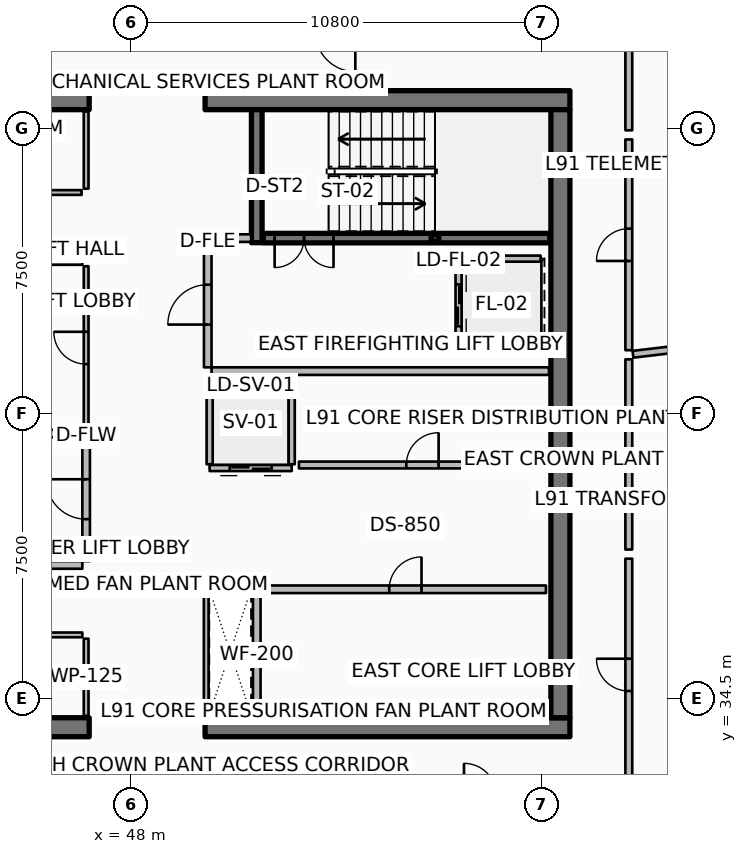
"""IFC4 building model, lengths in metres.
Left out: names, types, materials, properties, quantities, classifications, styles, units other than length and angle.
Written with IfcOpenShell. Run it as: python <this file> out.ifc"""

import sys

from ifc_helpers import new_model, si_unit, direction, frame, frame_2d, origin, origin_2d, place, context, subcontext, project, spatial, rectangle, hollow_rectangle, extrude, element, fill, save


model = new_model("IFC4")
c1 = context("Model", 3, precision=1e-05, world=origin(), true_north=direction((0.0, 1.0)))
c2 = subcontext(c1, "Body", "Model", "MODEL_VIEW")
j1 = project(units=[si_unit("LENGTHUNIT", "METRE"), si_unit("PLANEANGLEUNIT", "RADIAN")], contexts=[c1])
p1 = place(None, origin())
s1 = spatial("IfcSite", under=j1, at=p1, CompositionType="ELEMENT")
p2 = place(p1, origin())
s2 = spatial("IfcBuilding", under=s1, at=p2, CompositionType="ELEMENT")
p3 = place(p2, frame((0.0, 0.0, 363.2)))
s3 = spatial("IfcBuildingStorey", under=s2, at=p3, CompositionType="ELEMENT", Elevation=363.2)
p4 = place(p3, frame((37.3, 33.75, 0.0), z_axis=(0.0, 0.0, 1.0), x_axis=(1.0, 0.0, 0.0)))
e1 = element("IfcWall", 1, at=p4, inside=s3, PredefinedType="SHEAR", context=c2, shape_type="SweptSolid", body=[
    extrude(rectangle(XDim=9.6, YDim=0.5, at=frame_2d((4.8, 0.0))), origin(), (0.0, 0.0, 1.0), 3.6),
])
p5 = place(p3, frame((49.95, 33.75, 0.0), z_axis=(0.0, 0.0, 1.0), x_axis=(1.0, 0.0, 0.0)))
e2 = element("IfcWall", 2, at=p5, inside=s3, PredefinedType="SHEAR", context=c2, shape_type="SweptSolid", body=[
    extrude(rectangle(XDim=9.6, YDim=0.5, at=frame_2d((4.8, 0.0))), origin(), (0.0, 0.0, 1.0), 3.6),
])
p6 = place(p3, frame((37.3, 50.25, 0.0), z_axis=(0.0, 0.0, 1.0), x_axis=(1.0, 0.0, 0.0)))
e3 = element("IfcWall", 3, at=p6, inside=s3, PredefinedType="SHEAR", context=c2, shape_type="SweptSolid", body=[
    extrude(rectangle(XDim=9.6, YDim=0.5, at=frame_2d((4.8, 0.0))), origin(), (0.0, 0.0, 1.0), 3.6),
])
p7 = place(p3, frame((49.95, 50.25, 0.0), z_axis=(0.0, 0.0, 1.0), x_axis=(1.0, 0.0, 0.0)))
e4 = element("IfcWall", 4, at=p7, inside=s3, PredefinedType="SHEAR", context=c2, shape_type="SweptSolid", body=[
    extrude(rectangle(XDim=9.6, YDim=0.5, at=frame_2d((4.8, 0.0))), origin(), (0.0, 0.0, 1.0), 3.6),
])
p8 = place(p3, frame((59.3, 34.0, 0.0), z_axis=(0.0, 0.0, 1.0), x_axis=(0.0, 1.0, 0.0)))
e5 = element("IfcWall", 5, at=p8, inside=s3, PredefinedType="SHEAR", context=c2, shape_type="SweptSolid", body=[
    extrude(rectangle(XDim=16.0, YDim=0.5, at=frame_2d((8.0, 0.0))), origin(), (0.0, 0.0, 1.0), 3.6),
])
p9 = place(p3, frame((51.31, 46.5, 0.0), z_axis=(0.0, 0.0, 1.0), x_axis=(0.0, 1.0, 0.0)))
e6 = element("IfcWall", 6, at=p9, inside=s3, PredefinedType="SHEAR", context=c2, shape_type="SweptSolid", body=[
    extrude(rectangle(XDim=3.5, YDim=0.28, at=frame_2d((1.75, 0.0))), origin(), (0.0, 0.0, 1.0), 3.6),
])
p10 = place(p3, frame((56.0, 46.62, 0.0), z_axis=(0.0, 0.0, 1.0), x_axis=(1.0, 0.0, 0.0)))
e7 = element("IfcColumn", 7, at=p10, inside=s3, PredefinedType="COLUMN", context=c2, shape_type="SweptSolid", body=[
    extrude(hollow_rectangle(XDim=0.2, YDim=0.2, WallThickness=0.01, InnerFilletRadius=0.01, OuterFilletRadius=0.02, at=origin_2d()), origin(), (0.0, 0.0, 1.0), 1.595),
])
p11 = place(p3, frame((51.48, 46.62, 0.0), z_axis=(0.0, 0.0, 1.0), x_axis=(1.0, 0.0, 0.0)))
e8 = element("IfcWall", 8, at=p11, inside=s3, PredefinedType="SOLIDWALL", context=c2, shape_type="SweptSolid", body=[
    extrude(rectangle(XDim=7.54, YDim=0.25, at=frame_2d((3.77, 0.0))), origin(), (0.0, 0.0, 1.0), 3.32),
])
p12 = place(p11, frame((0.3, 0.0, 0.0)))
e9 = element("IfcOpeningElement", 9, at=p12, cuts=e8, PredefinedType="OPENING", context=c2, shape_type="SweptSolid", body=[
    extrude(rectangle(XDim=1.55, YDim=2.15, at=frame_2d((0.775, 1.075))), frame((0.0, 0.135, 0.0), z_axis=(0.0, -1.0, 0.0), x_axis=(1.0, 0.0, 0.0)), (0.0, 0.0, 1.0), 0.27),
])
p13 = place(p3, frame((51.52, 37.38, 0.0), z_axis=(0.0, 0.0, 1.0), x_axis=(1.0, 0.0, 0.0)))
e10 = element("IfcWall", 10, at=p13, inside=s3, PredefinedType="PARTITIONING", context=c2, shape_type="SweptSolid", body=[
    extrude(rectangle(XDim=7.4, YDim=0.2, at=frame_2d((3.7, 0.0))), origin(), (0.0, 0.0, 1.0), 3.32),
])
p14 = place(p13, frame((3.275, 0.0, 0.0)))
e11 = element("IfcOpeningElement", 11, at=p14, cuts=e10, PredefinedType="OPENING", context=c2, shape_type="SweptSolid", body=[
    extrude(rectangle(XDim=0.85, YDim=2.06, at=frame_2d((0.425, 1.03))), frame((0.0, 0.11, 0.0), z_axis=(0.0, -1.0, 0.0), x_axis=(1.0, 0.0, 0.0)), (0.0, 0.0, 1.0), 0.22),
])
p15 = place(p3, frame((51.31, 34.05, 0.0), z_axis=(0.0, 0.0, 1.0), x_axis=(0.0, 1.0, 0.0)))
e12 = element("IfcWall", 12, at=p15, inside=s3, PredefinedType="PARTITIONING", context=c2, shape_type="SweptSolid", body=[
    extrude(rectangle(XDim=3.21, YDim=0.2, at=frame_2d((1.605, 0.0))), origin(), (0.0, 0.0, 1.0), 3.32),
])
p16 = place(p3, frame((56.62, 46.08, 0.0), z_axis=(0.0, 0.0, 1.0), x_axis=(0.0, -1.0, 0.0)))
e13 = element("IfcWall", 13, at=p16, inside=s3, PredefinedType="PARTITIONING", context=c2, shape_type="SweptSolid", body=[
    extrude(rectangle(XDim=2.46, YDim=0.16, at=frame_2d((1.23, 0.0))), origin(), (0.0, 0.0, 1.0), 3.32),
])
p17 = place(p16, frame((0.68, 0.0, 0.0)))
e14 = element("IfcOpeningElement", 14, at=p17, cuts=e13, PredefinedType="OPENING", context=c2, shape_type="SweptSolid", body=[
    extrude(rectangle(XDim=1.1, YDim=2.1, at=frame_2d((0.55, 1.05))), frame((0.0, 0.09, 0.0), z_axis=(0.0, -1.0, 0.0), x_axis=(1.0, 0.0, 0.0)), (0.0, 0.0, 1.0), 0.18),
])
for number, where, z_axis, x_axis in (
    (15, (56.72, 46.08, 0.0), (0.0, 0.0, 1.0), (1.0, 0.0, 0.0)),
    (16, (56.72, 43.62, 0.0), (0.0, 0.0, 1.0), (1.0, 0.0, 0.0)),
):
    element("IfcWall", number, at=place(p3, frame(where, z_axis=z_axis, x_axis=x_axis)), inside=s3, PredefinedType="PARTITIONING", context=c2, shape_type="SweptSolid", body=[
        extrude(rectangle(XDim=2.06, YDim=0.16, at=frame_2d((1.03, 0.0))), origin(), (0.0, 0.0, 1.0), 3.32),
    ])
p18 = place(p3, frame((52.23, 40.57, 0.0), z_axis=(0.0, 0.0, 1.0), x_axis=(-1.0, 0.0, 0.0)))
e17 = element("IfcWall", 17, at=p18, inside=s3, PredefinedType="PARTITIONING", context=c2, shape_type="SweptSolid", body=[
    extrude(rectangle(XDim=2.16, YDim=0.16, at=frame_2d((1.08, 0.0))), origin(), (0.0, 0.0, 1.0), 3.32),
])
p19 = place(p18, frame((0.53, 0.0, 0.0)))
e18 = element("IfcOpeningElement", 18, at=p19, cuts=e17, PredefinedType="OPENING", context=c2, shape_type="SweptSolid", body=[
    extrude(rectangle(XDim=1.1, YDim=2.1, at=frame_2d((0.55, 1.05))), frame((0.0, 0.09, 0.0), z_axis=(0.0, -1.0, 0.0), x_axis=(1.0, 0.0, 0.0)), (0.0, 0.0, 1.0), 0.18),
])
for number, where, z_axis, x_axis in (
    (19, (52.23, 40.67, 0.0), (0.0, 0.0, 1.0), (0.0, 1.0, 0.0)),
    (20, (50.07, 40.67, 0.0), (0.0, 0.0, 1.0), (0.0, 1.0, 0.0)),
):
    element("IfcWall", number, at=place(p3, frame(where, z_axis=z_axis, x_axis=x_axis)), inside=s3, PredefinedType="PARTITIONING", context=c2, shape_type="SweptSolid", body=[
        extrude(rectangle(XDim=2.16, YDim=0.16, at=frame_2d((1.08, 0.0))), origin(), (0.0, 0.0, 1.0), 3.32),
    ])
p20 = place(p3, frame((50.17, 42.93, 0.0), z_axis=(0.0, 0.0, 1.0), x_axis=(1.0, 0.0, 0.0)))
e21 = element("IfcWall", 21, at=p20, inside=s3, PredefinedType="PARTITIONING", context=c2, shape_type="SweptSolid", body=[
    extrude(rectangle(XDim=1.96, YDim=0.16, at=frame_2d((0.98, 0.0))), origin(), (0.0, 0.0, 1.0), 3.32),
])
p21 = place(p3, frame((52.42, 40.65, 0.0), z_axis=(0.0, 0.0, 1.0), x_axis=(1.0, 0.0, 0.0)))
e22 = element("IfcWall", 22, at=p21, inside=s3, PredefinedType="PARTITIONING", context=c2, shape_type="SweptSolid", body=[
    extrude(rectangle(XDim=6.5, YDim=0.18, at=frame_2d((3.25, 0.0))), origin(), (0.0, 0.0, 1.0), 3.32),
])
p22 = place(p21, frame((2.825, 0.0, 0.0)))
e23 = element("IfcOpeningElement", 23, at=p22, cuts=e22, PredefinedType="OPENING", context=c2, shape_type="SweptSolid", body=[
    extrude(rectangle(XDim=0.85, YDim=2.06, at=frame_2d((0.425, 1.03))), frame((0.0, 0.1, 0.0), z_axis=(0.0, -1.0, 0.0), x_axis=(1.0, 0.0, 0.0)), (0.0, 0.0, 1.0), 0.2),
])
p23 = place(p3, frame((46.82, 34.05, 0.0), z_axis=(0.0, 0.0, 1.0), x_axis=(0.0, 1.0, 0.0)))
e24 = element("IfcWall", 24, at=p23, inside=s3, PredefinedType="PARTITIONING", context=c2, shape_type="SweptSolid", body=[
    extrude(rectangle(XDim=2.03, YDim=0.125, at=frame_2d((1.015, 0.0))), origin(), (0.0, 0.0, 1.0), 2.76),
])
p24 = place(p3, frame((42.6, 36.18, 0.0), z_axis=(0.0, 0.0, 1.0), x_axis=(1.0, 0.0, 0.0)))
e25 = element("IfcWall", 25, at=p24, inside=s3, PredefinedType="PARTITIONING", context=c2, shape_type="SweptSolid", body=[
    extrude(rectangle(XDim=4.12, YDim=0.125, at=frame_2d((2.06, 0.0))), origin(), (0.0, 0.0, 1.0), 2.76),
])
p25 = place(p24, frame((1.635, 0.0, 0.0)))
e26 = element("IfcOpeningElement", 26, at=p25, cuts=e25, PredefinedType="OPENING", context=c2, shape_type="SweptSolid", body=[
    extrude(rectangle(XDim=0.85, YDim=2.06, at=frame_2d((0.425, 1.03))), frame((0.0, 0.073, 0.0), z_axis=(0.0, -1.0, 0.0), x_axis=(1.0, 0.0, 0.0)), (0.0, 0.0, 1.0), 0.145),
])
p26 = place(p3, frame((46.82, 47.92, 0.0), z_axis=(0.0, 0.0, 1.0), x_axis=(0.0, 1.0, 0.0)))
e27 = element("IfcWall", 27, at=p26, inside=s3, PredefinedType="PARTITIONING", context=c2, shape_type="SweptSolid", body=[
    extrude(rectangle(XDim=2.03, YDim=0.125, at=frame_2d((1.015, 0.0))), origin(), (0.0, 0.0, 1.0), 2.76),
])
p27 = place(p3, frame((37.92, 47.82, 0.0), z_axis=(0.0, 0.0, 1.0), x_axis=(1.0, 0.0, 0.0)))
e28 = element("IfcWall", 28, at=p27, inside=s3, PredefinedType="PARTITIONING", context=c2, shape_type="SweptSolid", body=[
    extrude(rectangle(XDim=8.78, YDim=0.125, at=frame_2d((4.39, 0.0))), origin(), (0.0, 0.0, 1.0), 2.76),
])
p28 = place(p27, frame((3.965, 0.0, 0.0)))
e29 = element("IfcOpeningElement", 29, at=p28, cuts=e28, PredefinedType="OPENING", context=c2, shape_type="SweptSolid", body=[
    extrude(rectangle(XDim=0.85, YDim=2.06, at=frame_2d((0.425, 1.03))), frame((0.0, 0.073, 0.0), z_axis=(0.0, -1.0, 0.0), x_axis=(1.0, 0.0, 0.0)), (0.0, 0.0, 1.0), 0.145),
])
p29 = place(p3, frame((41.35, 38.02, 0.0), z_axis=(0.0, 0.0, 1.0), x_axis=(1.0, 0.0, 0.0)))
e30 = element("IfcWall", 30, at=p29, inside=s3, PredefinedType="PARTITIONING", context=c2, shape_type="SweptSolid", body=[
    extrude(rectangle(XDim=5.37, YDim=0.2, at=frame_2d((2.685, 0.0))), origin(), (0.0, 0.0, 1.0), 3.32),
])
p30 = place(p3, frame((43.92, 41.48, 0.0), z_axis=(0.0, 0.0, 1.0), x_axis=(1.0, 0.0, 0.0)))
e31 = element("IfcWall", 31, at=p30, inside=s3, PredefinedType="PARTITIONING", context=c2, shape_type="SweptSolid", body=[
    extrude(rectangle(XDim=2.8, YDim=0.2, at=frame_2d((1.4, 0.0))), origin(), (0.0, 0.0, 1.0), 3.32),
])
p31 = place(p3, frame((46.82, 38.12, 0.0), z_axis=(0.0, 0.0, 1.0), x_axis=(0.0, 1.0, 0.0)))
e32 = element("IfcWall", 32, at=p31, inside=s3, PredefinedType="PARTITIONING", context=c2, shape_type="SweptSolid", body=[
    extrude(rectangle(XDim=3.26, YDim=0.2, at=frame_2d((1.63, 0.0))), origin(), (0.0, 0.0, 1.0), 3.32),
])
p32 = place(p31, frame((1.105, 0.0, 0.0)))
e33 = element("IfcOpeningElement", 33, at=p32, cuts=e32, PredefinedType="OPENING", context=c2, shape_type="SweptSolid", body=[
    extrude(rectangle(XDim=1.05, YDim=2.1, at=frame_2d((0.525, 1.05))), frame((0.0, 0.11, 0.0), z_axis=(0.0, -1.0, 0.0), x_axis=(1.0, 0.0, 0.0)), (0.0, 0.0, 1.0), 0.22),
])
p33 = place(p3, frame((50.12, 43.12, 0.0), z_axis=(0.0, 0.0, 1.0), x_axis=(1.0, 0.0, 0.0)))
e34 = element("IfcWall", 34, at=p33, inside=s3, PredefinedType="PARTITIONING", context=c2, shape_type="SweptSolid", body=[
    extrude(rectangle(XDim=8.88, YDim=0.2, at=frame_2d((4.44, 0.0))), origin(), (0.0, 0.0, 1.0), 3.32),
])
p34 = place(p3, frame((50.14, 46.62, 0.0), z_axis=(0.0, 0.0, 1.0), x_axis=(1.0, 0.0, 0.0)))
e35 = element("IfcWall", 35, at=p34, inside=s3, PredefinedType="PARTITIONING", context=c2, shape_type="SweptSolid", body=[
    extrude(rectangle(XDim=1.02, YDim=0.2, at=frame_2d((0.51, 0.0))), origin(), (0.0, 0.0, 1.0), 3.32),
])
p35 = place(p3, frame((50.02, 43.22, 0.0), z_axis=(0.0, 0.0, 1.0), x_axis=(0.0, 1.0, 0.0)))
e36 = element("IfcWall", 36, at=p35, inside=s3, PredefinedType="PARTITIONING", context=c2, shape_type="SweptSolid", body=[
    extrude(rectangle(XDim=3.3, YDim=0.2, at=frame_2d((1.65, 0.0))), origin(), (0.0, 0.0, 1.0), 3.32),
])
p36 = place(p35, frame((1.125, 0.0, 0.0)))
e37 = element("IfcOpeningElement", 37, at=p36, cuts=e36, PredefinedType="OPENING", context=c2, shape_type="SweptSolid", body=[
    extrude(rectangle(XDim=1.05, YDim=2.1, at=frame_2d((0.525, 1.05))), frame((0.0, 0.11, 0.0), z_axis=(0.0, -1.0, 0.0), x_axis=(1.0, 0.0, 0.0)), (0.0, 0.0, 1.0), 0.22),
])
p37 = place(p3, frame((41.36, 45.98, 0.0), z_axis=(0.0, 0.0, 1.0), x_axis=(1.0, 0.0, 0.0)))
e38 = element("IfcWall", 38, at=p37, inside=s3, PredefinedType="PARTITIONING", context=c2, shape_type="SweptSolid", body=[
    extrude(rectangle(XDim=5.36, YDim=0.125, at=frame_2d((2.68, 0.0))), origin(), (0.0, 0.0, 1.0), 2.76),
])
p38 = place(p3, frame((49.98, 34.06, 0.0), z_axis=(0.0, 0.0, 1.0), x_axis=(0.0, 1.0, 0.0)))
e39 = element("IfcWall", 39, at=p38, inside=s3, PredefinedType="PARTITIONING", context=c2, shape_type="SweptSolid", body=[
    extrude(rectangle(XDim=3.4, YDim=0.125, at=frame_2d((1.7, 0.0))), origin(), (0.0, 0.0, 1.0), 2.76),
])
p39 = place(p3, frame((49.98, 37.44, 0.0), z_axis=(0.0, 0.0, 1.0), x_axis=(1.0, 0.0, 0.0)))
e40 = element("IfcWall", 40, at=p39, inside=s3, PredefinedType="PARTITIONING", context=c2, shape_type="SweptSolid", body=[
    extrude(rectangle(XDim=1.26, YDim=0.125, at=frame_2d((0.63, 0.0))), origin(), (0.0, 0.0, 1.0), 2.76),
])
p40 = place(p3, frame((46.82, 41.58, 0.0), z_axis=(0.0, 0.0, 1.0), x_axis=(0.0, 1.0, 0.0)))
e41 = element("IfcWall", 41, at=p40, inside=s3, PredefinedType="PARTITIONING", context=c2, shape_type="SweptSolid", body=[
    extrude(rectangle(XDim=4.3, YDim=0.125, at=frame_2d((2.15, 0.0))), origin(), (0.0, 0.0, 1.0), 2.76),
])
p41 = place(p40, frame((1.725, 0.0, 0.0)))
e42 = element("IfcOpeningElement", 42, at=p41, cuts=e41, PredefinedType="OPENING", context=c2, shape_type="SweptSolid", body=[
    extrude(rectangle(XDim=0.85, YDim=2.06, at=frame_2d((0.425, 1.03))), frame((0.0, 0.073, 0.0), z_axis=(0.0, -1.0, 0.0), x_axis=(1.0, 0.0, 0.0)), (0.0, 0.0, 1.0), 0.145),
])
p42 = place(p3, frame((61.1, 32.07, 0.0), z_axis=(0.0, 0.0, 1.0), x_axis=(0.0, 1.0, 0.0)))
e43 = element("IfcWall", 43, at=p42, inside=s3, PredefinedType="PARTITIONING", context=c2, shape_type="SweptSolid", body=[
    extrude(rectangle(XDim=6.115, YDim=0.18, at=frame_2d((3.058, 0.0))), origin(), (0.0, 0.0, 1.0), 2.76),
])
p43 = place(p42, frame((2.633, 0.0, 0.0)))
e44 = element("IfcOpeningElement", 44, at=p43, cuts=e43, PredefinedType="OPENING", context=c2, shape_type="SweptSolid", body=[
    extrude(rectangle(XDim=0.85, YDim=2.06, at=frame_2d((0.425, 1.03))), frame((0.0, 0.1, 0.0), z_axis=(0.0, -1.0, 0.0), x_axis=(1.0, 0.0, 0.0)), (0.0, 0.0, 1.0), 0.2),
])
p44 = place(p3, frame((61.1, 38.425, 0.0), z_axis=(0.0, 0.0, 1.0), x_axis=(0.0, 1.0, 0.0)))
e45 = element("IfcWall", 45, at=p44, inside=s3, PredefinedType="PARTITIONING", context=c2, shape_type="SweptSolid", body=[
    extrude(rectangle(XDim=5.005, YDim=0.18, at=frame_2d((2.502, 0.0))), origin(), (0.0, 0.0, 1.0), 2.76),
])
p45 = place(p3, frame((61.209, 43.563, 0.0), z_axis=(0.0, 0.0, 1.0), x_axis=(0.993070558818, 0.117519637545, 0.0)))
e46 = element("IfcWall", 46, at=p45, inside=s3, PredefinedType="PARTITIONING", context=c2, shape_type="SweptSolid", body=[
    extrude(rectangle(XDim=7.83, YDim=0.18, at=frame_2d((3.915, 0.0))), origin(), (0.0, 0.0, 1.0), 2.76),
])
p46 = place(p3, frame((61.1, 43.67, 0.0), z_axis=(0.0, 0.0, 1.0), x_axis=(0.0, 1.0, 0.0)))
e47 = element("IfcWall", 47, at=p46, inside=s3, PredefinedType="PARTITIONING", context=c2, shape_type="SweptSolid", body=[
    extrude(rectangle(XDim=5.546, YDim=0.18, at=frame_2d((2.773, 0.0))), origin(), (0.0, 0.0, 1.0), 2.76),
])
p47 = place(p46, frame((2.348, 0.0, 0.0)))
e48 = element("IfcOpeningElement", 48, at=p47, cuts=e47, PredefinedType="OPENING", context=c2, shape_type="SweptSolid", body=[
    extrude(rectangle(XDim=0.85, YDim=2.06, at=frame_2d((0.425, 1.03))), frame((0.0, 0.1, 0.0), z_axis=(0.0, -1.0, 0.0), x_axis=(1.0, 0.0, 0.0)), (0.0, 0.0, 1.0), 0.2),
])
p48 = place(p3, frame((61.1, 49.456, 0.0), z_axis=(0.0, 0.0, 1.0), x_axis=(0.0, 1.0, 0.0)))
e49 = element("IfcWall", 49, at=p48, inside=s3, PredefinedType="PARTITIONING", context=c2, shape_type="SweptSolid", body=[
    extrude(rectangle(XDim=2.474, YDim=0.18, at=frame_2d((1.237, 0.0))), origin(), (0.0, 0.0, 1.0), 2.76),
])
p49 = place(p12, origin())
e50 = element("IfcDoor", 50, at=p49, inside=s3, OperationType="DOUBLE_DOOR_SINGLE_SWING", PredefinedType="DOOR", context=c2, shape_type="SweptSolid", body=[
    extrude(rectangle(XDim=1.55, YDim=2.15, at=frame_2d((0.775, 1.075))), frame((0.0, 0.025, 0.0), z_axis=(0.0, -1.0, 0.0), x_axis=(1.0, 0.0, 0.0)), (0.0, 0.0, 1.0), 0.05),
])
fill(e9, e50)
p50 = place(p14, origin())
e51 = element("IfcDoor", 51, at=p50, inside=s3, OperationType="SINGLE_SWING_RIGHT", PredefinedType="DOOR", context=c2, shape_type="SweptSolid", body=[
    extrude(rectangle(XDim=0.85, YDim=2.06, at=frame_2d((0.425, 1.03))), frame((0.0, 0.025, 0.0), z_axis=(0.0, -1.0, 0.0), x_axis=(1.0, 0.0, 0.0)), (0.0, 0.0, 1.0), 0.05),
])
fill(e11, e51)
p51 = place(p17, origin())
e52 = element("IfcDoor", 52, at=p51, inside=s3, OperationType="DOUBLE_DOOR_SLIDING", PredefinedType="DOOR", context=c2, shape_type="SweptSolid", body=[
    extrude(rectangle(XDim=1.1, YDim=2.1, at=frame_2d((0.55, 1.05))), frame((0.0, 0.025, 0.0), z_axis=(0.0, -1.0, 0.0), x_axis=(1.0, 0.0, 0.0)), (0.0, 0.0, 1.0), 0.05),
])
fill(e14, e52)
p52 = place(p19, origin())
e53 = element("IfcDoor", 53, at=p52, inside=s3, OperationType="DOUBLE_DOOR_SLIDING", PredefinedType="DOOR", context=c2, shape_type="SweptSolid", body=[
    extrude(rectangle(XDim=1.1, YDim=2.1, at=frame_2d((0.55, 1.05))), frame((0.0, 0.025, 0.0), z_axis=(0.0, -1.0, 0.0), x_axis=(1.0, 0.0, 0.0)), (0.0, 0.0, 1.0), 0.05),
])
fill(e18, e53)
p53 = place(p22, origin())
e54 = element("IfcDoor", 54, at=p53, inside=s3, OperationType="SINGLE_SWING_RIGHT", PredefinedType="DOOR", context=c2, shape_type="SweptSolid", body=[
    extrude(rectangle(XDim=0.85, YDim=2.06, at=frame_2d((0.425, 1.03))), frame((0.0, 0.025, 0.0), z_axis=(0.0, -1.0, 0.0), x_axis=(1.0, 0.0, 0.0)), (0.0, 0.0, 1.0), 0.05),
])
fill(e23, e54)
p54 = place(p32, origin())
e55 = element("IfcDoor", 55, at=p54, inside=s3, OperationType="SINGLE_SWING_RIGHT", PredefinedType="DOOR", context=c2, shape_type="SweptSolid", body=[
    extrude(rectangle(XDim=1.05, YDim=2.1, at=frame_2d((0.525, 1.05))), frame((0.0, 0.025, 0.0), z_axis=(0.0, -1.0, 0.0), x_axis=(1.0, 0.0, 0.0)), (0.0, 0.0, 1.0), 0.05),
])
fill(e33, e55)
p55 = place(p36, origin())
e56 = element("IfcDoor", 56, at=p55, inside=s3, OperationType="SINGLE_SWING_LEFT", PredefinedType="DOOR", context=c2, shape_type="SweptSolid", body=[
    extrude(rectangle(XDim=1.05, YDim=2.1, at=frame_2d((0.525, 1.05))), frame((0.0, 0.025, 0.0), z_axis=(0.0, -1.0, 0.0), x_axis=(1.0, 0.0, 0.0)), (0.0, 0.0, 1.0), 0.05),
])
fill(e37, e56)
p56 = place(p41, origin())
e57 = element("IfcDoor", 57, at=p56, inside=s3, OperationType="SINGLE_SWING_RIGHT", PredefinedType="DOOR", context=c2, shape_type="SweptSolid", body=[
    extrude(rectangle(XDim=0.85, YDim=2.06, at=frame_2d((0.425, 1.03))), frame((0.0, 0.025, 0.0), z_axis=(0.0, -1.0, 0.0), x_axis=(1.0, 0.0, 0.0)), (0.0, 0.0, 1.0), 0.05),
])
fill(e42, e57)
p57 = place(p43, origin())
e58 = element("IfcDoor", 58, at=p57, inside=s3, OperationType="SINGLE_SWING_RIGHT", PredefinedType="DOOR", context=c2, shape_type="SweptSolid", body=[
    extrude(rectangle(XDim=0.85, YDim=2.06, at=frame_2d((0.425, 1.03))), frame((0.0, 0.025, 0.0), z_axis=(0.0, -1.0, 0.0), x_axis=(1.0, 0.0, 0.0)), (0.0, 0.0, 1.0), 0.05),
])
fill(e44, e58)
p58 = place(p47, origin())
e59 = element("IfcDoor", 59, at=p58, inside=s3, OperationType="SINGLE_SWING_LEFT", PredefinedType="DOOR", context=c2, shape_type="SweptSolid", body=[
    extrude(rectangle(XDim=0.85, YDim=2.06, at=frame_2d((0.425, 1.03))), frame((0.0, 0.025, 0.0), z_axis=(0.0, -1.0, 0.0), x_axis=(1.0, 0.0, 0.0)), (0.0, 0.0, 1.0), 0.05),
])
fill(e48, e59)
save(model, sys.argv[1])
